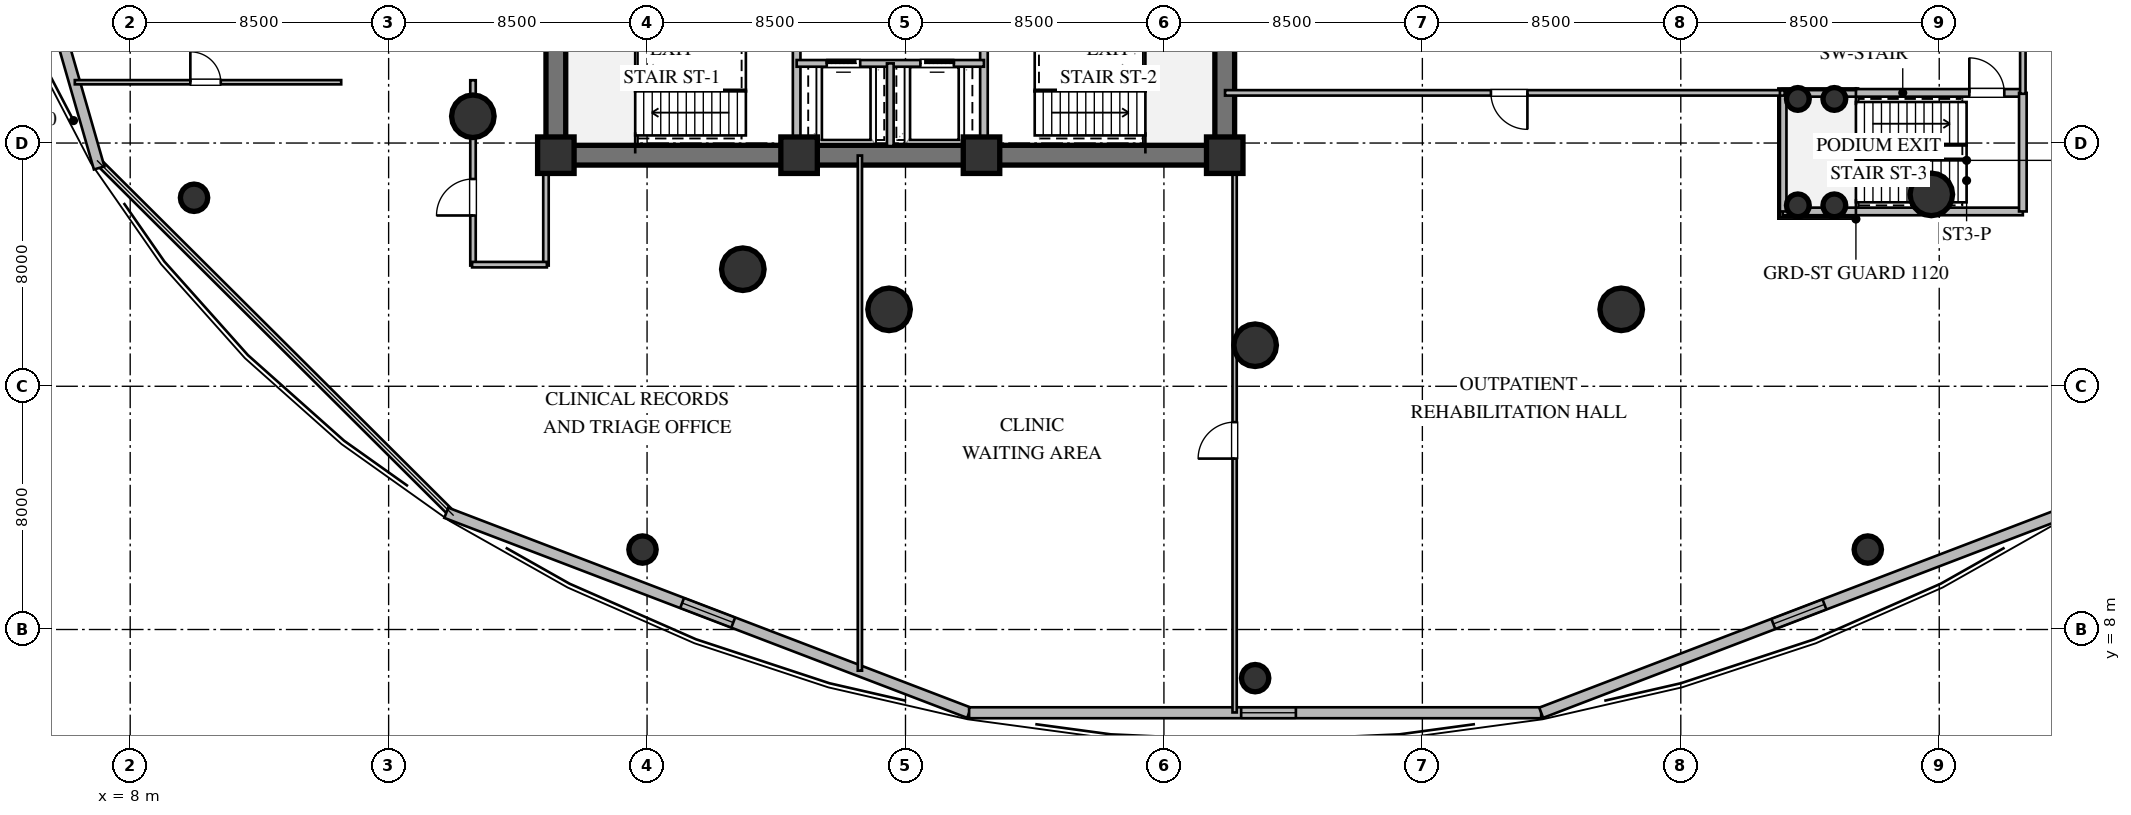
"""IFC4 building model, lengths in metres.
Left out: names, types, materials, properties, quantities, classifications, styles, units other than length and angle.
Written with IfcOpenShell. Run it as: python <this file> out.ifc"""

import sys

from ifc_helpers import new_model, si_unit, direction, frame, frame_2d, origin, origin_2d, place, context, subcontext, project, spatial, rectangle, circle, extrude, element, fill, save


model = new_model("IFC4")
c1 = context("Model", 3, precision=1e-05, world=origin(), true_north=direction((0.0, 1.0)))
c2 = subcontext(c1, "Body", "Model", "MODEL_VIEW")
j1 = project(units=[si_unit("LENGTHUNIT", "METRE"), si_unit("PLANEANGLEUNIT", "RADIAN")], contexts=[c1])
p1 = place(None, origin())
s1 = spatial("IfcSite", under=j1, at=p1, CompositionType="ELEMENT")
p2 = place(p1, origin())
s2 = spatial("IfcBuilding", under=s1, at=p2, CompositionType="ELEMENT")
p3 = place(p2, frame((0.0, 0.0, 4.8)))
s3 = spatial("IfcBuildingStorey", under=s2, at=p3, CompositionType="ELEMENT", Elevation=4.8)
p4 = place(p3, frame((21.675, 23.6, 0.0), z_axis=(0.0, 0.0, 1.0), x_axis=(1.0, 0.0, 0.0)))
e1 = element("IfcWall", 1, at=p4, inside=s3, PredefinedType="SHEAR", context=c2, shape_type="SweptSolid", body=[
    extrude(rectangle(XDim=22.65, YDim=0.65, at=frame_2d((11.325, 0.0))), origin(), (0.0, 0.0, 1.0), 4.52),
])
p5 = place(p3, frame((22.0, 23.925, 0.0), z_axis=(0.0, 0.0, 1.0), x_axis=(0.0, 1.0, 0.0)))
e2 = element("IfcWall", 2, at=p5, inside=s3, PredefinedType="SHEAR", context=c2, shape_type="SweptSolid", body=[
    extrude(rectangle(XDim=12.15, YDim=0.65, at=frame_2d((6.075, 0.0))), origin(), (0.0, 0.0, 1.0), 4.52),
])
p6 = place(p3, frame((44.0, 23.925, 0.0), z_axis=(0.0, 0.0, 1.0), x_axis=(0.0, 1.0, 0.0)))
e3 = element("IfcWall", 3, at=p6, inside=s3, PredefinedType="SHEAR", context=c2, shape_type="SweptSolid", body=[
    extrude(rectangle(XDim=12.15, YDim=0.65, at=frame_2d((6.075, 0.0))), origin(), (0.0, 0.0, 1.0), 4.52),
])
p7 = place(p6, frame((8.775, 0.0, 0.0)))
e4 = element("IfcOpeningElement", 4, at=p7, cuts=e3, PredefinedType="OPENING", context=c2, shape_type="SweptSolid", body=[
    extrude(rectangle(XDim=1.5, YDim=2.15, at=frame_2d((0.75, 1.075))), frame((0.0, 0.335, 0.0), z_axis=(0.0, -1.0, 0.0), x_axis=(1.0, 0.0, 0.0)), (0.0, 0.0, 1.0), 0.67),
])
for number, where, z_axis, x_axis in (
    (5, (22.0, 23.6, 0.0), (0.0, 0.0, 1.0), (1.0, 0.0, 0.0)),
    (6, (30.0, 23.6, 0.0), (0.0, 0.0, 1.0), (1.0, 0.0, 0.0)),
    (7, (36.0, 23.6, 0.0), (0.0, 0.0, 1.0), (1.0, 0.0, 0.0)),
    (8, (44.0, 23.6, 0.0), (0.0, 0.0, 1.0), (1.0, 0.0, 0.0)),
):
    element("IfcColumn", number, at=place(p3, frame(where, z_axis=z_axis, x_axis=x_axis)), inside=s3, PredefinedType="COLUMN", context=c2, shape_type="SweptSolid", body=[
        extrude(rectangle(XDim=1.2, YDim=1.2, at=origin_2d()), origin(), (0.0, 0.0, 1.0), 4.8),
    ])
for number, where, z_axis, x_axis in (
    (9, (19.27, 24.88, 0.0), (0.0, 0.0, 1.0), (1.0, 0.0, 0.0)),
    (10, (28.15, 19.85, 0.0), (0.0, 0.0, 1.0), (1.0, 0.0, 0.0)),
    (11, (32.96, 18.53, 0.0), (0.0, 0.0, 1.0), (1.0, 0.0, 0.0)),
    (12, (45.0, 17.35, 0.0), (0.0, 0.0, 1.0), (1.0, 0.0, 0.0)),
    (13, (57.04, 18.53, 0.0), (0.0, 0.0, 1.0), (1.0, 0.0, 0.0)),
    (14, (67.24, 22.31, 0.0), (0.0, 0.0, 1.0), (1.0, 0.0, 0.0)),
):
    element("IfcColumn", number, at=place(p3, frame(where, z_axis=z_axis, x_axis=x_axis)), inside=s3, PredefinedType="COLUMN", context=c2, shape_type="SweptSolid", body=[
        extrude(circle(Radius=0.7, at=origin_2d()), origin(), (0.0, 0.0, 1.0), 4.8),
    ])
for number, where, z_axis, x_axis in (
    (15, (10.1, 22.2, 0.0), (0.0, 0.0, 1.0), (1.0, 0.0, 0.0)),
    (16, (24.85, 10.63, 0.0), (0.0, 0.0, 1.0), (1.0, 0.0, 0.0)),
    (17, (45.0, 6.4, 0.0), (0.0, 0.0, 1.0), (1.0, 0.0, 0.0)),
    (18, (65.15, 10.63, 0.0), (0.0, 0.0, 1.0), (1.0, 0.0, 0.0)),
):
    element("IfcColumn", number, at=place(p3, frame(where, z_axis=z_axis, x_axis=x_axis)), inside=s3, PredefinedType="COLUMN", context=c2, shape_type="SweptSolid", body=[
        extrude(circle(Radius=0.45, at=origin_2d()), origin(), (0.0, 0.0, 1.0), 4.8),
    ])
for number, where, z_axis, x_axis in (
    (19, (62.85, 21.95, 0.0), (0.0, 0.0, 1.0), (1.0, 0.0, 0.0)),
    (20, (62.85, 25.45, 0.0), (0.0, 0.0, 1.0), (1.0, 0.0, 0.0)),
    (21, (64.05, 21.95, 0.0), (0.0, 0.0, 1.0), (1.0, 0.0, 0.0)),
    (22, (64.05, 25.45, 0.0), (0.0, 0.0, 1.0), (1.0, 0.0, 0.0)),
):
    element("IfcColumn", number, at=place(p3, frame(where, z_axis=z_axis, x_axis=x_axis)), inside=s3, PredefinedType="COLUMN", context=c2, shape_type="SweptSolid", body=[
        extrude(circle(Radius=0.375, at=origin_2d()), origin(), (0.0, 0.0, 1.0), 4.8),
    ])
p8 = place(p3, frame((2.72, 38.0, 0.0), z_axis=(0.0, 0.0, 1.0), x_axis=(0.276203409751, -0.961099202186, 0.0)))
e23 = element("IfcWall", 23, at=p8, inside=s3, PredefinedType="STANDARD", context=c2, shape_type="SweptSolid", body=[
    extrude(rectangle(XDim=15.42, YDim=0.36, at=frame_2d((7.71, 0.0))), origin(), (0.0, 0.0, 1.0), 4.52),
])
p9 = place(p8, frame((6.81, 0.0, 1.05)))
e24 = element("IfcOpeningElement", 24, at=p9, cuts=e23, PredefinedType="OPENING", context=c2, shape_type="SweptSolid", body=[
    extrude(rectangle(XDim=1.8, YDim=1.7, at=frame_2d((0.9, 0.85))), frame((0.0, 0.19, 0.0), z_axis=(0.0, -1.0, 0.0), x_axis=(1.0, 0.0, 0.0)), (0.0, 0.0, 1.0), 0.38),
])
p10 = place(p3, frame((18.396, 11.839, 0.0), z_axis=(0.0, 0.0, 1.0), x_axis=(0.934012147289, -0.357241247221, 0.0)))
e25 = element("IfcWall", 25, at=p10, inside=s3, PredefinedType="STANDARD", context=c2, shape_type="SweptSolid", body=[
    extrude(rectangle(XDim=18.411, YDim=0.36, at=frame_2d((9.206, 0.0))), origin(), (0.0, 0.0, 1.0), 4.52),
])
p11 = place(p10, frame((8.305, 0.0, 1.05)))
e26 = element("IfcOpeningElement", 26, at=p11, cuts=e25, PredefinedType="OPENING", context=c2, shape_type="SweptSolid", body=[
    extrude(rectangle(XDim=1.8, YDim=1.7, at=frame_2d((0.9, 0.85))), frame((0.0, 0.19, 0.0), z_axis=(0.0, -1.0, 0.0), x_axis=(1.0, 0.0, 0.0)), (0.0, 0.0, 1.0), 0.38),
])
p12 = place(p3, frame((35.592, 5.262, 0.0), z_axis=(0.0, 0.0, 1.0), x_axis=(1.0, 0.0, 0.0)))
e27 = element("IfcWall", 27, at=p12, inside=s3, PredefinedType="STANDARD", context=c2, shape_type="SweptSolid", body=[
    extrude(rectangle(XDim=18.816, YDim=0.36, at=frame_2d((9.408, 0.0))), origin(), (0.0, 0.0, 1.0), 4.52),
])
p13 = place(p12, frame((8.948, 0.0, 1.05)))
e28 = element("IfcOpeningElement", 28, at=p13, cuts=e27, PredefinedType="OPENING", context=c2, shape_type="SweptSolid", body=[
    extrude(rectangle(XDim=1.8, YDim=1.7, at=frame_2d((0.9, 0.85))), frame((0.0, 0.19, 0.0), z_axis=(0.0, -1.0, 0.0), x_axis=(1.0, 0.0, 0.0)), (0.0, 0.0, 1.0), 0.38),
])
p14 = place(p3, frame((54.408, 5.262, 0.0), z_axis=(0.0, 0.0, 1.0), x_axis=(0.934014086565, 0.357236176917, 0.0)))
e29 = element("IfcWall", 29, at=p14, inside=s3, PredefinedType="STANDARD", context=c2, shape_type="SweptSolid", body=[
    extrude(rectangle(XDim=18.151, YDim=0.36, at=frame_2d((9.075, 0.0))), origin(), (0.0, 0.0, 1.0), 4.52),
])
p15 = place(p14, frame((8.175, 0.0, 1.05)))
e30 = element("IfcOpeningElement", 30, at=p15, cuts=e29, PredefinedType="OPENING", context=c2, shape_type="SweptSolid", body=[
    extrude(rectangle(XDim=1.8, YDim=1.7, at=frame_2d((0.9, 0.85))), frame((0.0, 0.19, 0.0), z_axis=(0.0, -1.0, 0.0), x_axis=(1.0, 0.0, 0.0)), (0.0, 0.0, 1.0), 0.38),
])
p16 = place(p3, frame((29.92, 23.9, 0.0), z_axis=(0.0, 0.0, 1.0), x_axis=(0.0, 1.0, 0.0)))
e31 = element("IfcWall", 31, at=p16, inside=s3, PredefinedType="SOLIDWALL", context=c2, shape_type="SweptSolid", body=[
    extrude(rectangle(XDim=5.4, YDim=0.25, at=frame_2d((2.7, 0.0))), origin(), (0.0, 0.0, 1.0), 4.52),
])
p17 = place(p16, frame((3.421, 0.0, 0.0)))
e32 = element("IfcOpeningElement", 32, at=p17, cuts=e31, PredefinedType="OPENING", context=c2, shape_type="SweptSolid", body=[
    extrude(rectangle(XDim=1.15, YDim=2.1, at=frame_2d((0.575, 1.05))), frame((0.0, 0.135, 0.0), z_axis=(0.0, -1.0, 0.0), x_axis=(1.0, 0.0, 0.0)), (0.0, 0.0, 1.0), 0.27),
])
p18 = place(p3, frame((36.08, 23.9, 0.0), z_axis=(0.0, 0.0, 1.0), x_axis=(0.0, 1.0, 0.0)))
e33 = element("IfcWall", 33, at=p18, inside=s3, PredefinedType="SOLIDWALL", context=c2, shape_type="SweptSolid", body=[
    extrude(rectangle(XDim=5.4, YDim=0.25, at=frame_2d((2.7, 0.0))), origin(), (0.0, 0.0, 1.0), 4.52),
])
p19 = place(p18, frame((3.421, 0.0, 0.0)))
e34 = element("IfcOpeningElement", 34, at=p19, cuts=e33, PredefinedType="OPENING", context=c2, shape_type="SweptSolid", body=[
    extrude(rectangle(XDim=1.15, YDim=2.1, at=frame_2d((0.575, 1.05))), frame((0.0, 0.135, 0.0), z_axis=(0.0, -1.0, 0.0), x_axis=(1.0, 0.0, 0.0)), (0.0, 0.0, 1.0), 0.27),
])
p20 = place(p3, frame((29.92, 26.62, 0.0), z_axis=(0.0, 0.0, 1.0), x_axis=(1.0, 0.0, 0.0)))
e35 = element("IfcWall", 35, at=p20, inside=s3, PredefinedType="SOLIDWALL", context=c2, shape_type="SweptSolid", body=[
    extrude(rectangle(XDim=6.16, YDim=0.22, at=frame_2d((3.08, 0.0))), origin(), (0.0, 0.0, 1.0), 4.52),
])
p21 = place(p20, frame((0.99, 0.0, 0.0)))
e36 = element("IfcOpeningElement", 36, at=p21, cuts=e35, PredefinedType="OPENING", context=c2, shape_type="SweptSolid", body=[
    extrude(rectangle(XDim=1.1, YDim=2.1, at=frame_2d((0.55, 1.05))), frame((0.0, 0.12, 0.0), z_axis=(0.0, -1.0, 0.0), x_axis=(1.0, 0.0, 0.0)), (0.0, 0.0, 1.0), 0.24),
])
p22 = place(p20, frame((4.07, 0.0, 0.0)))
e37 = element("IfcOpeningElement", 37, at=p22, cuts=e35, PredefinedType="OPENING", context=c2, shape_type="SweptSolid", body=[
    extrude(rectangle(XDim=1.1, YDim=2.1, at=frame_2d((0.55, 1.05))), frame((0.0, 0.12, 0.0), z_axis=(0.0, -1.0, 0.0), x_axis=(1.0, 0.0, 0.0)), (0.0, 0.0, 1.0), 0.24),
])
p23 = place(p3, frame((33.0, 23.9, 0.0), z_axis=(0.0, 0.0, 1.0), x_axis=(0.0, 1.0, 0.0)))
e38 = element("IfcWall", 38, at=p23, inside=s3, PredefinedType="SOLIDWALL", context=c2, shape_type="SweptSolid", body=[
    extrude(rectangle(XDim=2.72, YDim=0.22, at=frame_2d((1.36, 0.0))), origin(), (0.0, 0.0, 1.0), 4.52),
])
p24 = place(p3, frame((62.35, 25.65, 0.0), z_axis=(0.0, 0.0, 1.0), x_axis=(1.0, 0.0, 0.0)))
e39 = element("IfcWall", 39, at=p24, inside=s3, PredefinedType="SOLIDWALL", context=c2, shape_type="SweptSolid", body=[
    extrude(rectangle(XDim=7.9, YDim=0.25, at=frame_2d((3.95, 0.0))), origin(), (0.0, 0.0, 1.0), 4.52),
])
p25 = place(p24, frame((6.14, 0.0, 0.0)))
e40 = element("IfcOpeningElement", 40, at=p25, cuts=e39, PredefinedType="OPENING", context=c2, shape_type="SweptSolid", body=[
    extrude(rectangle(XDim=1.15, YDim=2.1, at=frame_2d((0.575, 1.05))), frame((0.0, 0.135, 0.0), z_axis=(0.0, -1.0, 0.0), x_axis=(1.0, 0.0, 0.0)), (0.0, 0.0, 1.0), 0.27),
])
p26 = place(p3, frame((62.35, 21.75, 0.0), z_axis=(0.0, 0.0, 1.0), x_axis=(1.0, 0.0, 0.0)))
e41 = element("IfcWall", 41, at=p26, inside=s3, PredefinedType="SOLIDWALL", context=c2, shape_type="SweptSolid", body=[
    extrude(rectangle(XDim=7.9, YDim=0.25, at=frame_2d((3.95, 0.0))), origin(), (0.0, 0.0, 1.0), 4.52),
])
p27 = place(p3, frame((62.35, 21.75, 0.0), z_axis=(0.0, 0.0, 1.0), x_axis=(0.0, 1.0, 0.0)))
e42 = element("IfcWall", 42, at=p27, inside=s3, PredefinedType="SOLIDWALL", context=c2, shape_type="SweptSolid", body=[
    extrude(rectangle(XDim=3.9, YDim=0.25, at=frame_2d((1.95, 0.0))), origin(), (0.0, 0.0, 1.0), 1.887),
])
p28 = place(p3, frame((70.25, 21.75, 0.0), z_axis=(0.0, 0.0, 1.0), x_axis=(0.0, 1.0, 0.0)))
e43 = element("IfcWall", 43, at=p28, inside=s3, PredefinedType="SOLIDWALL", context=c2, shape_type="SweptSolid", body=[
    extrude(rectangle(XDim=3.9, YDim=0.25, at=frame_2d((1.95, 0.0))), origin(), (0.0, 0.0, 1.0), 4.52),
])
p29 = place(p3, frame((62.415, 25.65, 0.0), z_axis=(0.0, 0.0, 1.0), x_axis=(-1.0, 0.0, 0.0)))
e44 = element("IfcWall", 44, at=p29, inside=s3, PredefinedType="PARTITIONING", context=c2, shape_type="SweptSolid", body=[
    extrude(rectangle(XDim=18.405, YDim=0.18, at=frame_2d((9.203, 0.0))), origin(), (0.0, 0.0, 1.0), 4.05),
])
p30 = place(p29, frame((8.46, 0.0, 0.0)))
e45 = element("IfcOpeningElement", 45, at=p30, cuts=e44, PredefinedType="OPENING", context=c2, shape_type="SweptSolid", body=[
    extrude(rectangle(XDim=1.2, YDim=2.15, at=frame_2d((0.6, 1.075))), frame((0.0, 0.1, 0.0), z_axis=(0.0, -1.0, 0.0), x_axis=(1.0, 0.0, 0.0)), (0.0, 0.0, 1.0), 0.2),
])
p31 = place(p3, frame((70.25, 28.08, 0.0), z_axis=(0.0, 0.0, 1.0), x_axis=(0.0, -1.0, 0.0)))
e46 = element("IfcWall", 46, at=p31, inside=s3, PredefinedType="PARTITIONING", context=c2, shape_type="SweptSolid", body=[
    extrude(rectangle(XDim=2.46, YDim=0.18, at=frame_2d((1.23, 0.0))), origin(), (0.0, 0.0, 1.0), 4.52),
])
p32 = place(p3, frame((19.275, 19.97, 0.0), z_axis=(0.0, 0.0, 1.0), x_axis=(0.0, 1.0, 0.0)))
e47 = element("IfcWall", 47, at=p32, inside=s3, PredefinedType="PARTITIONING", context=c2, shape_type="SweptSolid", body=[
    extrude(rectangle(XDim=6.095, YDim=0.18, at=frame_2d((3.047, 0.0))), origin(), (0.0, 0.0, 1.0), 3.898),
])
p33 = place(p32, frame((1.647, 0.0, 0.0)))
e48 = element("IfcOpeningElement", 48, at=p33, cuts=e47, PredefinedType="OPENING", context=c2, shape_type="SweptSolid", body=[
    extrude(rectangle(XDim=1.2, YDim=2.15, at=frame_2d((0.6, 1.075))), frame((0.0, 0.1, 0.0), z_axis=(0.0, -1.0, 0.0), x_axis=(1.0, 0.0, 0.0)), (0.0, 0.0, 1.0), 0.2),
])
p34 = place(p3, frame((21.675, 23.59, 0.0), z_axis=(0.0, 0.0, 1.0), x_axis=(0.0, -1.0, 0.0)))
e49 = element("IfcWall", 49, at=p34, inside=s3, PredefinedType="PARTITIONING", context=c2, shape_type="SweptSolid", body=[
    extrude(rectangle(XDim=3.62, YDim=0.18, at=frame_2d((1.81, 0.0))), origin(), (0.0, 0.0, 1.0), 3.66),
])
p35 = place(p3, frame((21.705, 20.0, 0.0), z_axis=(0.0, 0.0, 1.0), x_axis=(-1.0, 0.0, 0.0)))
e50 = element("IfcWall", 50, at=p35, inside=s3, PredefinedType="PARTITIONING", context=c2, shape_type="SweptSolid", body=[
    extrude(rectangle(XDim=2.46, YDim=0.18, at=frame_2d((1.23, 0.0))), origin(), (0.0, 0.0, 1.0), 4.52),
])
p36 = place(p3, frame((44.325, 5.272, 0.0), z_axis=(0.0, 0.0, 1.0), x_axis=(0.0, 1.0, 0.0)))
e51 = element("IfcWall", 51, at=p36, inside=s3, PredefinedType="PARTITIONING", context=c2, shape_type="SweptSolid", body=[
    extrude(rectangle(XDim=18.318, YDim=0.14, at=frame_2d((9.159, 0.0))), origin(), (0.0, 0.0, 1.0), 3.66),
])
p37 = place(p36, frame((8.349, 0.0, 0.0)))
e52 = element("IfcOpeningElement", 52, at=p37, cuts=e51, PredefinedType="OPENING", context=c2, shape_type="SweptSolid", body=[
    extrude(rectangle(XDim=1.2, YDim=2.15, at=frame_2d((0.6, 1.075))), frame((0.0, 0.08, 0.0), z_axis=(0.0, -1.0, 0.0), x_axis=(1.0, 0.0, 0.0)), (0.0, 0.0, 1.0), 0.16),
])
p38 = place(p3, frame((6.179, 26.0, 0.0), z_axis=(0.0, 0.0, 1.0), x_axis=(1.0, 0.0, 0.0)))
e53 = element("IfcWall", 53, at=p38, inside=s3, PredefinedType="PARTITIONING", context=c2, shape_type="SweptSolid", body=[
    extrude(rectangle(XDim=8.761, YDim=0.14, at=frame_2d((4.381, 0.0))), origin(), (0.0, 0.0, 1.0), 4.52),
])
p39 = place(p38, frame((3.8, 0.0, 0.0)))
e54 = element("IfcOpeningElement", 54, at=p39, cuts=e53, PredefinedType="OPENING", context=c2, shape_type="SweptSolid", body=[
    extrude(rectangle(XDim=1.0, YDim=2.1, at=frame_2d((0.5, 1.05))), frame((0.0, 0.08, 0.0), z_axis=(0.0, -1.0, 0.0), x_axis=(1.0, 0.0, 0.0)), (0.0, 0.0, 1.0), 0.16),
])
p40 = place(p3, frame((32.0, 23.59, 0.0), z_axis=(0.0, 0.0, 1.0), x_axis=(0.0, -1.0, 0.0)))
e55 = element("IfcWall", 55, at=p40, inside=s3, PredefinedType="PARTITIONING", context=c2, shape_type="SweptSolid", body=[
    extrude(rectangle(XDim=16.944, YDim=0.14, at=frame_2d((8.472, 0.0))), origin(), (0.0, 0.0, 1.0), 4.52),
])
p41 = place(p11, origin())
e56 = element("IfcWindow", 56, at=p41, inside=s3, PartitioningType="SINGLE_PANEL", PredefinedType="WINDOW", context=c2, shape_type="SweptSolid", body=[
    extrude(rectangle(XDim=1.8, YDim=1.7, at=frame_2d((0.9, 0.85))), frame((0.0, 0.03, 0.0), z_axis=(0.0, -1.0, 0.0), x_axis=(1.0, 0.0, 0.0)), (0.0, 0.0, 1.0), 0.06),
])
fill(e26, e56)
p42 = place(p13, origin())
e57 = element("IfcWindow", 57, at=p42, inside=s3, PartitioningType="SINGLE_PANEL", PredefinedType="WINDOW", context=c2, shape_type="SweptSolid", body=[
    extrude(rectangle(XDim=1.8, YDim=1.7, at=frame_2d((0.9, 0.85))), frame((0.0, 0.03, 0.0), z_axis=(0.0, -1.0, 0.0), x_axis=(1.0, 0.0, 0.0)), (0.0, 0.0, 1.0), 0.06),
])
fill(e28, e57)
p43 = place(p15, origin())
e58 = element("IfcWindow", 58, at=p43, inside=s3, PartitioningType="SINGLE_PANEL", PredefinedType="WINDOW", context=c2, shape_type="SweptSolid", body=[
    extrude(rectangle(XDim=1.8, YDim=1.7, at=frame_2d((0.9, 0.85))), frame((0.0, 0.03, 0.0), z_axis=(0.0, -1.0, 0.0), x_axis=(1.0, 0.0, 0.0)), (0.0, 0.0, 1.0), 0.06),
])
fill(e30, e58)
p44 = place(p21, origin())
e59 = element("IfcDoor", 59, at=p44, inside=s3, OperationType="SLIDING_TO_LEFT", PredefinedType="DOOR", context=c2, shape_type="SweptSolid", body=[
    extrude(rectangle(XDim=1.1, YDim=2.1, at=frame_2d((0.55, 1.05))), frame((0.0, 0.025, 0.0), z_axis=(0.0, -1.0, 0.0), x_axis=(1.0, 0.0, 0.0)), (0.0, 0.0, 1.0), 0.05),
])
fill(e36, e59)
p45 = place(p22, origin())
e60 = element("IfcDoor", 60, at=p45, inside=s3, OperationType="SLIDING_TO_RIGHT", PredefinedType="DOOR", context=c2, shape_type="SweptSolid", body=[
    extrude(rectangle(XDim=1.1, YDim=2.1, at=frame_2d((0.55, 1.05))), frame((0.0, 0.025, 0.0), z_axis=(0.0, -1.0, 0.0), x_axis=(1.0, 0.0, 0.0)), (0.0, 0.0, 1.0), 0.05),
])
fill(e37, e60)
p46 = place(p25, origin())
e61 = element("IfcDoor", 61, at=p46, inside=s3, OperationType="SINGLE_SWING_LEFT", PredefinedType="DOOR", context=c2, shape_type="SweptSolid", body=[
    extrude(rectangle(XDim=1.15, YDim=2.1, at=frame_2d((0.575, 1.05))), frame((0.0, 0.025, 0.0), z_axis=(0.0, -1.0, 0.0), x_axis=(1.0, 0.0, 0.0)), (0.0, 0.0, 1.0), 0.05),
])
fill(e40, e61)
p47 = place(p30, origin())
e62 = element("IfcDoor", 62, at=p47, inside=s3, OperationType="SINGLE_SWING_LEFT", PredefinedType="DOOR", context=c2, shape_type="SweptSolid", body=[
    extrude(rectangle(XDim=1.2, YDim=2.15, at=frame_2d((0.6, 1.075))), frame((0.0, 0.025, 0.0), z_axis=(0.0, -1.0, 0.0), x_axis=(1.0, 0.0, 0.0)), (0.0, 0.0, 1.0), 0.05),
])
fill(e45, e62)
p48 = place(p33, origin())
e63 = element("IfcDoor", 63, at=p48, inside=s3, OperationType="SINGLE_SWING_LEFT", PredefinedType="DOOR", context=c2, shape_type="SweptSolid", body=[
    extrude(rectangle(XDim=1.2, YDim=2.15, at=frame_2d((0.6, 1.075))), frame((0.0, 0.025, 0.0), z_axis=(0.0, -1.0, 0.0), x_axis=(1.0, 0.0, 0.0)), (0.0, 0.0, 1.0), 0.05),
])
fill(e48, e63)
p49 = place(p37, origin())
e64 = element("IfcDoor", 64, at=p49, inside=s3, OperationType="SINGLE_SWING_LEFT", PredefinedType="DOOR", context=c2, shape_type="SweptSolid", body=[
    extrude(rectangle(XDim=1.2, YDim=2.15, at=frame_2d((0.6, 1.075))), frame((0.0, 0.025, 0.0), z_axis=(0.0, -1.0, 0.0), x_axis=(1.0, 0.0, 0.0)), (0.0, 0.0, 1.0), 0.05),
])
fill(e52, e64)
p50 = place(p39, origin())
e65 = element("IfcDoor", 65, at=p50, inside=s3, OperationType="SINGLE_SWING_LEFT", PredefinedType="DOOR", context=c2, shape_type="SweptSolid", body=[
    extrude(rectangle(XDim=1.0, YDim=2.1, at=frame_2d((0.5, 1.05))), frame((0.0, 0.025, 0.0), z_axis=(0.0, -1.0, 0.0), x_axis=(1.0, 0.0, 0.0)), (0.0, 0.0, 1.0), 0.05),
])
fill(e54, e65)
save(model, sys.argv[1])
